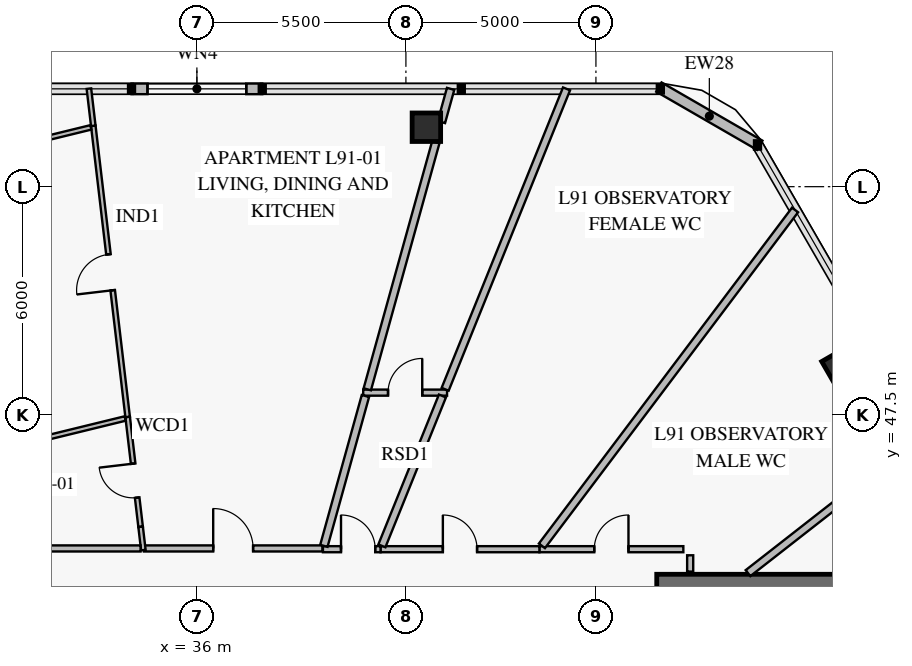
"""IFC4 building model, lengths in metres.
Left out: names, types, materials, properties, quantities, classifications, styles, units other than length and angle.
Written with IfcOpenShell. Run it as: python <this file> out.ifc"""

import sys

from ifc_helpers import new_model, si_unit, direction, frame, frame_2d, origin, origin_2d, place, context, subcontext, project, spatial, rectangle, extrude, element, fill, save


model = new_model("IFC4")
c1 = context("Model", 3, precision=1e-05, world=origin(), true_north=direction((0.0, 1.0)))
c2 = subcontext(c1, "Body", "Model", "MODEL_VIEW")
j1 = project(units=[si_unit("LENGTHUNIT", "METRE"), si_unit("PLANEANGLEUNIT", "RADIAN")], contexts=[c1])
p1 = place(None, origin())
s1 = spatial("IfcSite", under=j1, at=p1, CompositionType="ELEMENT")
p2 = place(p1, origin())
s2 = spatial("IfcBuilding", under=s1, at=p2, CompositionType="ELEMENT")
p3 = place(p2, frame((0.0, 0.0, 357.6)))
s3 = spatial("IfcBuildingStorey", under=s2, at=p3, CompositionType="ELEMENT", Elevation=357.6)
for number, where, z_axis, x_axis in (
    (1, (52.955, 48.762, 0.0), (0.0, 0.0, 1.0), (-0.5, 0.866, 0.0)),
    (2, (42.039, 55.064, 0.0), (0.0, 0.0, 1.0), (-1.0, 0.0, 0.0)),
):
    element("IfcColumn", number, at=place(p3, frame(where, z_axis=z_axis, x_axis=x_axis)), inside=s3, PredefinedType="COLUMN", context=c2, shape_type="SweptSolid", body=[
        extrude(rectangle(XDim=0.75, YDim=0.75, at=origin_2d()), origin(), (0.0, 0.0, 1.0), 3.35),
    ])
p4 = place(p3, frame((52.9, 43.05, 0.0), z_axis=(0.0, 0.0, 1.0), x_axis=(-1.0, 0.0, 0.0)))
e3 = element("IfcWall", 3, at=p4, inside=s3, PredefinedType="SHEAR", context=c2, shape_type="SweptSolid", body=[
    extrude(rectangle(XDim=4.8, YDim=0.5, at=frame_2d((2.4, 0.0))), origin(), (0.0, 0.0, 1.0), 3.8),
])
p5 = place(p3, frame((34.28, 56.074, 0.0), z_axis=(0.0, 0.0, 1.0), x_axis=(1.0, 0.0, 0.0)))
e4 = element("IfcWall", 4, at=p5, inside=s3, PredefinedType="SOLIDWALL", context=c2, shape_type="SweptSolid", body=[
    extrude(rectangle(XDim=3.44, YDim=0.28, at=frame_2d((1.72, 0.0))), origin(), (0.0, 0.0, 1.0), 3.35),
])
p6 = place(p5, frame((0.42, 0.0, 0.7)))
e5 = element("IfcOpeningElement", 5, at=p6, cuts=e4, PredefinedType="OPENING", context=c2, shape_type="SweptSolid", body=[
    extrude(rectangle(XDim=2.6, YDim=1.8, at=frame_2d((1.3, 0.9))), frame((0.0, 0.152, 0.0), z_axis=(0.0, -1.0, 0.0), x_axis=(1.0, 0.0, 0.0)), (0.0, 0.0, 1.0), 0.304),
])
p7 = place(p3, frame((48.157, 56.122, 0.0), z_axis=(0.0, 0.0, 1.0), x_axis=(0.866023752521, -0.50000286006, 0.0)))
e6 = element("IfcWall", 6, at=p7, inside=s3, PredefinedType="SOLIDWALL", context=c2, shape_type="SweptSolid", body=[
    extrude(rectangle(XDim=3.065, YDim=0.28, at=frame_2d((1.532, 0.0))), origin(), (0.0, 0.0, 1.0), 3.35),
])
p8 = place(p3, frame((48.8, 43.96, 0.0), z_axis=(0.0, 0.0, 1.0), x_axis=(-1.0, 0.0, 0.0)))
e7 = element("IfcWall", 7, at=p8, inside=s3, PredefinedType="PARTITIONING", context=c2, shape_type="SweptSolid", body=[
    extrude(rectangle(XDim=3.788, YDim=0.16, at=frame_2d((1.894, 0.0))), origin(), (0.0, 0.0, 1.0), 3.35),
])
p9 = place(p8, frame((1.444, 0.0, 0.0)))
e8 = element("IfcOpeningElement", 8, at=p9, cuts=e7, PredefinedType="OPENING", context=c2, shape_type="SweptSolid", body=[
    extrude(rectangle(XDim=0.9, YDim=2.1, at=frame_2d((0.45, 1.05))), frame((0.0, 0.092, 0.0), z_axis=(0.0, -1.0, 0.0), x_axis=(1.0, 0.0, 0.0)), (0.0, 0.0, 1.0), 0.184),
])
p10 = place(p3, frame((45.012, 43.96, 0.0), z_axis=(0.0, 0.0, 1.0), x_axis=(-1.0, 0.0, 0.0)))
e9 = element("IfcWall", 9, at=p10, inside=s3, PredefinedType="PARTITIONING", context=c2, shape_type="SweptSolid", body=[
    extrude(rectangle(XDim=4.18, YDim=0.16, at=frame_2d((2.09, 0.0))), origin(), (0.0, 0.0, 1.0), 3.35),
])
p11 = place(p10, frame((1.64, 0.0, 0.0)))
e10 = element("IfcOpeningElement", 10, at=p11, cuts=e9, PredefinedType="OPENING", context=c2, shape_type="SweptSolid", body=[
    extrude(rectangle(XDim=0.9, YDim=2.1, at=frame_2d((0.45, 1.05))), frame((0.0, 0.092, 0.0), z_axis=(0.0, -1.0, 0.0), x_axis=(1.0, 0.0, 0.0)), (0.0, 0.0, 1.0), 0.184),
])
p12 = place(p3, frame((40.376, 48.08, 0.0), z_axis=(0.0, 0.0, 1.0), x_axis=(1.0, 0.0, 0.0)))
e11 = element("IfcWall", 11, at=p12, inside=s3, PredefinedType="PARTITIONING", context=c2, shape_type="SweptSolid", body=[
    extrude(rectangle(XDim=2.207, YDim=0.16, at=frame_2d((1.103, 0.0))), origin(), (0.0, 0.0, 1.0), 3.35),
])
p13 = place(p12, frame((0.653, 0.0, 0.0)))
e12 = element("IfcOpeningElement", 12, at=p13, cuts=e11, PredefinedType="OPENING", context=c2, shape_type="SweptSolid", body=[
    extrude(rectangle(XDim=0.9, YDim=2.1, at=frame_2d((0.45, 1.05))), frame((0.0, 0.092, 0.0), z_axis=(0.0, -1.0, 0.0), x_axis=(1.0, 0.0, 0.0)), (0.0, 0.0, 1.0), 0.184),
])
p14 = place(p3, frame((40.832, 43.96, 0.0), z_axis=(0.0, 0.0, 1.0), x_axis=(-1.0, 0.0, 0.0)))
e13 = element("IfcWall", 13, at=p14, inside=s3, PredefinedType="PARTITIONING", context=c2, shape_type="SweptSolid", body=[
    extrude(rectangle(XDim=1.515, YDim=0.16, at=frame_2d((0.758, 0.0))), origin(), (0.0, 0.0, 1.0), 3.35),
])
p15 = place(p14, frame((0.14, 0.0, 0.0)))
e14 = element("IfcOpeningElement", 14, at=p15, cuts=e13, PredefinedType="OPENING", context=c2, shape_type="SweptSolid", body=[
    extrude(rectangle(XDim=0.9, YDim=2.1, at=frame_2d((0.45, 1.05))), frame((0.0, 0.092, 0.0), z_axis=(0.0, -1.0, 0.0), x_axis=(1.0, 0.0, 0.0)), (0.0, 0.0, 1.0), 0.184),
])
p16 = place(p3, frame((34.519, 44.55, 0.0), z_axis=(0.0, 0.0, 1.0), x_axis=(-0.117167277632, 0.993112193588, 0.0)))
e15 = element("IfcWall", 15, at=p16, inside=s3, PredefinedType="PARTITIONING", context=c2, shape_type="SweptSolid", body=[
    extrude(rectangle(XDim=2.911, YDim=0.12, at=frame_2d((1.456, 0.0))), origin(), (0.0, 0.0, 1.0), 3.35),
])
p17 = place(p16, frame((0.773, 0.0, 0.0)))
e16 = element("IfcOpeningElement", 16, at=p17, cuts=e15, PredefinedType="OPENING", context=c2, shape_type="SweptSolid", body=[
    extrude(rectangle(XDim=0.9, YDim=2.1, at=frame_2d((0.45, 1.05))), frame((0.0, 0.072, 0.0), z_axis=(0.0, -1.0, 0.0), x_axis=(1.0, 0.0, 0.0)), (0.0, 0.0, 1.0), 0.144),
])
p18 = place(p3, frame((34.178, 47.441, 0.0), z_axis=(0.0, 0.0, 1.0), x_axis=(-0.11719932595, 0.993108412006, 0.0)))
e17 = element("IfcWall", 17, at=p18, inside=s3, PredefinedType="PARTITIONING", context=c2, shape_type="SweptSolid", body=[
    extrude(rectangle(XDim=7.714, YDim=0.12, at=frame_2d((3.857, 0.0))), origin(), (0.0, 0.0, 1.0), 2.77),
])
p19 = place(p18, frame((3.357, 0.0, 0.0)))
e18 = element("IfcOpeningElement", 18, at=p19, cuts=e17, PredefinedType="OPENING", context=c2, shape_type="SweptSolid", body=[
    extrude(rectangle(XDim=0.95, YDim=2.1, at=frame_2d((0.475, 1.05))), frame((0.0, 0.072, 0.0), z_axis=(0.0, -1.0, 0.0), x_axis=(1.0, 0.0, 0.0)), (0.0, 0.0, 1.0), 0.144),
])
p20 = place(p3, frame((33.21, 55.06, 0.0), z_axis=(0.0, 0.0, 1.0), x_axis=(-0.971340795698, -0.237691099145, 0.0)))
e19 = element("IfcWall", 19, at=p20, inside=s3, PredefinedType="PARTITIONING", context=c2, shape_type="SweptSolid", body=[
    extrude(rectangle(XDim=14.131, YDim=0.12, at=frame_2d((7.066, 0.0))), origin(), (0.0, 0.0, 1.0), 2.77),
])
p21 = place(p20, frame((6.506, 0.0, 0.0)))
e20 = element("IfcOpeningElement", 20, at=p21, cuts=e19, PredefinedType="OPENING", context=c2, shape_type="SweptSolid", body=[
    extrude(rectangle(XDim=0.95, YDim=2.1, at=frame_2d((0.475, 1.05))), frame((0.0, 0.072, 0.0), z_axis=(0.0, -1.0, 0.0), x_axis=(1.0, 0.0, 0.0)), (0.0, 0.0, 1.0), 0.144),
])
p22 = place(p3, frame((39.302, 43.98, 0.0), z_axis=(0.0, 0.0, 1.0), x_axis=(-1.0, 0.0, 0.0)))
e21 = element("IfcWall", 21, at=p22, inside=s3, PredefinedType="PARTITIONING", context=c2, shape_type="SweptSolid", body=[
    extrude(rectangle(XDim=4.695, YDim=0.16, at=frame_2d((2.348, 0.0))), origin(), (0.0, 0.0, 1.0), 2.8),
])
p23 = place(p22, frame((1.823, 0.0, 0.0)))
e22 = element("IfcOpeningElement", 22, at=p23, cuts=e21, PredefinedType="OPENING", context=c2, shape_type="SweptSolid", body=[
    extrude(rectangle(XDim=1.05, YDim=2.15, at=frame_2d((0.525, 1.075))), frame((0.0, 0.092, 0.0), z_axis=(0.0, -1.0, 0.0), x_axis=(1.0, 0.0, 0.0)), (0.0, 0.0, 1.0), 0.184),
])
p24 = place(p3, frame((50.502, 43.33, 0.0), z_axis=(0.0, 0.0, 1.0), x_axis=(0.788021867537, 0.615647249879, 0.0)))
e23 = element("IfcWall", 23, at=p24, inside=s3, PredefinedType="PARTITIONING", context=c2, shape_type="SweptSolid", body=[
    extrude(rectangle(XDim=5.907, YDim=0.2, at=frame_2d((2.954, 0.0))), origin(), (0.0, 0.0, 1.0), 2.77),
])
p25 = place(p3, frame((45.079, 44.048, 0.0), z_axis=(0.0, 0.0, 1.0), x_axis=(0.601830257004, 0.798624030288, 0.0)))
e24 = element("IfcWall", 24, at=p25, inside=s3, PredefinedType="PARTITIONING", context=c2, shape_type="SweptSolid", body=[
    extrude(rectangle(XDim=11.067, YDim=0.2, at=frame_2d((5.534, 0.0))), origin(), (0.0, 0.0, 1.0), 2.77),
])
p26 = place(p3, frame((40.868, 44.048, 0.0), z_axis=(0.0, 0.0, 1.0), x_axis=(0.374624373524, 0.927176670738, 0.0)))
e25 = element("IfcWall", 25, at=p26, inside=s3, PredefinedType="PARTITIONING", context=c2, shape_type="SweptSolid", body=[
    extrude(rectangle(XDim=4.254, YDim=0.2, at=frame_2d((2.127, 0.0))), origin(), (0.0, 0.0, 1.0), 3.35),
])
p27 = place(p3, frame((42.532, 48.168, 0.0), z_axis=(0.0, 0.0, 1.0), x_axis=(0.374606955292, 0.927183708359, 0.0)))
e26 = element("IfcWall", 26, at=p27, inside=s3, PredefinedType="PARTITIONING", context=c2, shape_type="SweptSolid", body=[
    extrude(rectangle(XDim=8.527, YDim=0.2, at=frame_2d((4.264, 0.0))), origin(), (0.0, 0.0, 1.0), 2.77),
])
p28 = place(p3, frame((39.341, 44.048, 0.0), z_axis=(0.0, 0.0, 1.0), x_axis=(0.267243877392, 0.963628927542, 0.0)))
e27 = element("IfcWall", 27, at=p28, inside=s3, PredefinedType="PARTITIONING", context=c2, shape_type="SweptSolid", body=[
    extrude(rectangle(XDim=4.093, YDim=0.2, at=frame_2d((2.046, 0.0))), origin(), (0.0, 0.0, 1.0), 2.8),
])
p29 = place(p3, frame((40.484, 48.168, 0.0), z_axis=(0.0, 0.0, 1.0), x_axis=(0.267208963636, 0.963638609517, 0.0)))
e28 = element("IfcWall", 28, at=p29, inside=s3, PredefinedType="PARTITIONING", context=c2, shape_type="SweptSolid", body=[
    extrude(rectangle(XDim=6.747, YDim=0.2, at=frame_2d((3.373, 0.0))), origin(), (0.0, 0.0, 1.0), 2.8),
])
p30 = place(p3, frame((42.434, 55.199, 0.0), z_axis=(0.0, 0.0, 1.0), x_axis=(0.267255561647, 0.963625687064, 0.0)))
e29 = element("IfcWall", 29, at=p30, inside=s3, PredefinedType="PARTITIONING", context=c2, shape_type="SweptSolid", body=[
    extrude(rectangle(XDim=0.908, YDim=0.2, at=frame_2d((0.454, 0.0))), origin(), (0.0, 0.0, 1.0), 3.35),
])
p31 = place(p3, frame((34.592, 43.935, 0.0), z_axis=(0.0, 0.0, 1.0), x_axis=(-0.117138729821, 0.993115561239, 0.0)))
e30 = element("IfcWall", 30, at=p31, inside=s3, PredefinedType="PARTITIONING", context=c2, shape_type="SweptSolid", body=[
    extrude(rectangle(XDim=0.619, YDim=0.12, at=frame_2d((0.31, 0.0))), origin(), (0.0, 0.0, 1.0), 3.35),
])
p32 = place(p3, frame((33.274, 55.102, 0.0), z_axis=(0.0, 0.0, 1.0), x_axis=(-0.117071500169, 0.99312348872, 0.0)))
e31 = element("IfcWall", 31, at=p32, inside=s3, PredefinedType="PARTITIONING", context=c2, shape_type="SweptSolid", body=[
    extrude(rectangle(XDim=0.984, YDim=0.12, at=frame_2d((0.492, 0.0))), origin(), (0.0, 0.0, 1.0), 2.77),
])
p33 = place(p3, frame((34.114, 47.4, 0.0), z_axis=(0.0, 0.0, 1.0), x_axis=(-0.97134085317, -0.237690864282, 0.0)))
e32 = element("IfcWall", 32, at=p33, inside=s3, PredefinedType="PARTITIONING", context=c2, shape_type="SweptSolid", body=[
    extrude(rectangle(XDim=10.571, YDim=0.12, at=frame_2d((5.286, 0.0))), origin(), (0.0, 0.0, 1.0), 2.8),
])
p34 = place(p3, frame((48.98, 43.37, 0.0), z_axis=(0.0, 0.0, 1.0), x_axis=(0.0, 1.0, 0.0)))
e33 = element("IfcWall", 33, at=p34, inside=s3, PredefinedType="PARTITIONING", context=c2, shape_type="SweptSolid", body=[
    extrude(rectangle(XDim=0.43, YDim=0.16, at=frame_2d((0.215, 0.0))), origin(), (0.0, 0.0, 1.0), 3.35),
])
p35 = place(p3, frame((34.518, 43.98, 0.0), z_axis=(0.0, 0.0, 1.0), x_axis=(-1.0, 0.0, 0.0)))
e34 = element("IfcWall", 34, at=p35, inside=s3, PredefinedType="PARTITIONING", context=c2, shape_type="SweptSolid", body=[
    extrude(rectangle(XDim=9.609, YDim=0.16, at=frame_2d((4.805, 0.0))), origin(), (0.0, 0.0, 1.0), 2.8),
])
p36 = place(p6, origin())
e35 = element("IfcWindow", 35, at=p36, inside=s3, PartitioningType="SINGLE_PANEL", PredefinedType="WINDOW", context=c2, shape_type="SweptSolid", body=[
    extrude(rectangle(XDim=2.6, YDim=1.8, at=frame_2d((1.3, 0.9))), frame((0.0, 0.03, 0.0), z_axis=(0.0, -1.0, 0.0), x_axis=(1.0, 0.0, 0.0)), (0.0, 0.0, 1.0), 0.06),
])
fill(e5, e35)
p37 = place(p9, frame((0.9, 0.0, 0.0), z_axis=(0.0, 0.0, 1.0), x_axis=(-1.0, 0.0, 0.0)))
e36 = element("IfcDoor", 36, at=p37, inside=s3, OperationType="SINGLE_SWING_RIGHT", PredefinedType="DOOR", context=c2, shape_type="SweptSolid", body=[
    extrude(rectangle(XDim=0.9, YDim=2.1, at=frame_2d((0.45, 1.05))), frame((0.0, 0.025, 0.0), z_axis=(0.0, -1.0, 0.0), x_axis=(1.0, 0.0, 0.0)), (0.0, 0.0, 1.0), 0.05),
])
fill(e8, e36)
p38 = place(p11, frame((0.9, 0.0, 0.0), z_axis=(0.0, 0.0, 1.0), x_axis=(-1.0, 0.0, 0.0)))
e37 = element("IfcDoor", 37, at=p38, inside=s3, OperationType="SINGLE_SWING_LEFT", PredefinedType="DOOR", context=c2, shape_type="SweptSolid", body=[
    extrude(rectangle(XDim=0.9, YDim=2.1, at=frame_2d((0.45, 1.05))), frame((0.0, 0.025, 0.0), z_axis=(0.0, -1.0, 0.0), x_axis=(1.0, 0.0, 0.0)), (0.0, 0.0, 1.0), 0.05),
])
fill(e10, e37)
p39 = place(p13, origin())
e38 = element("IfcDoor", 38, at=p39, inside=s3, OperationType="SINGLE_SWING_RIGHT", PredefinedType="DOOR", context=c2, shape_type="SweptSolid", body=[
    extrude(rectangle(XDim=0.9, YDim=2.1, at=frame_2d((0.45, 1.05))), frame((0.0, 0.025, 0.0), z_axis=(0.0, -1.0, 0.0), x_axis=(1.0, 0.0, 0.0)), (0.0, 0.0, 1.0), 0.05),
])
fill(e12, e38)
p40 = place(p15, frame((0.9, 0.0, 0.0), z_axis=(0.0, 0.0, 1.0), x_axis=(-1.0, 0.0, 0.0)))
e39 = element("IfcDoor", 39, at=p40, inside=s3, OperationType="SINGLE_SWING_LEFT", PredefinedType="DOOR", context=c2, shape_type="SweptSolid", body=[
    extrude(rectangle(XDim=0.9, YDim=2.1, at=frame_2d((0.45, 1.05))), frame((0.0, 0.025, 0.0), z_axis=(0.0, -1.0, 0.0), x_axis=(1.0, 0.0, 0.0)), (0.0, 0.0, 1.0), 0.05),
])
fill(e14, e39)
p41 = place(p17, origin())
e40 = element("IfcDoor", 40, at=p41, inside=s3, OperationType="SINGLE_SWING_RIGHT", PredefinedType="DOOR", context=c2, shape_type="SweptSolid", body=[
    extrude(rectangle(XDim=0.9, YDim=2.1, at=frame_2d((0.45, 1.05))), frame((0.0, 0.025, 0.0), z_axis=(0.0, -1.0, 0.0), x_axis=(1.0, 0.0, 0.0)), (0.0, 0.0, 1.0), 0.05),
])
fill(e16, e40)
p42 = place(p19, origin())
e41 = element("IfcDoor", 41, at=p42, inside=s3, OperationType="SINGLE_SWING_LEFT", PredefinedType="DOOR", context=c2, shape_type="SweptSolid", body=[
    extrude(rectangle(XDim=0.95, YDim=2.1, at=frame_2d((0.475, 1.05))), frame((0.0, 0.025, 0.0), z_axis=(0.0, -1.0, 0.0), x_axis=(1.0, 0.0, 0.0)), (0.0, 0.0, 1.0), 0.05),
])
fill(e18, e41)
p43 = place(p23, frame((1.05, 0.0, 0.0), z_axis=(0.0, 0.0, 1.0), x_axis=(-1.0, 0.0, 0.0)))
e42 = element("IfcDoor", 42, at=p43, inside=s3, OperationType="SINGLE_SWING_LEFT", PredefinedType="DOOR", context=c2, shape_type="SweptSolid", body=[
    extrude(rectangle(XDim=1.05, YDim=2.15, at=frame_2d((0.525, 1.075))), frame((0.0, 0.025, 0.0), z_axis=(0.0, -1.0, 0.0), x_axis=(1.0, 0.0, 0.0)), (0.0, 0.0, 1.0), 0.05),
])
fill(e22, e42)
save(model, sys.argv[1])
